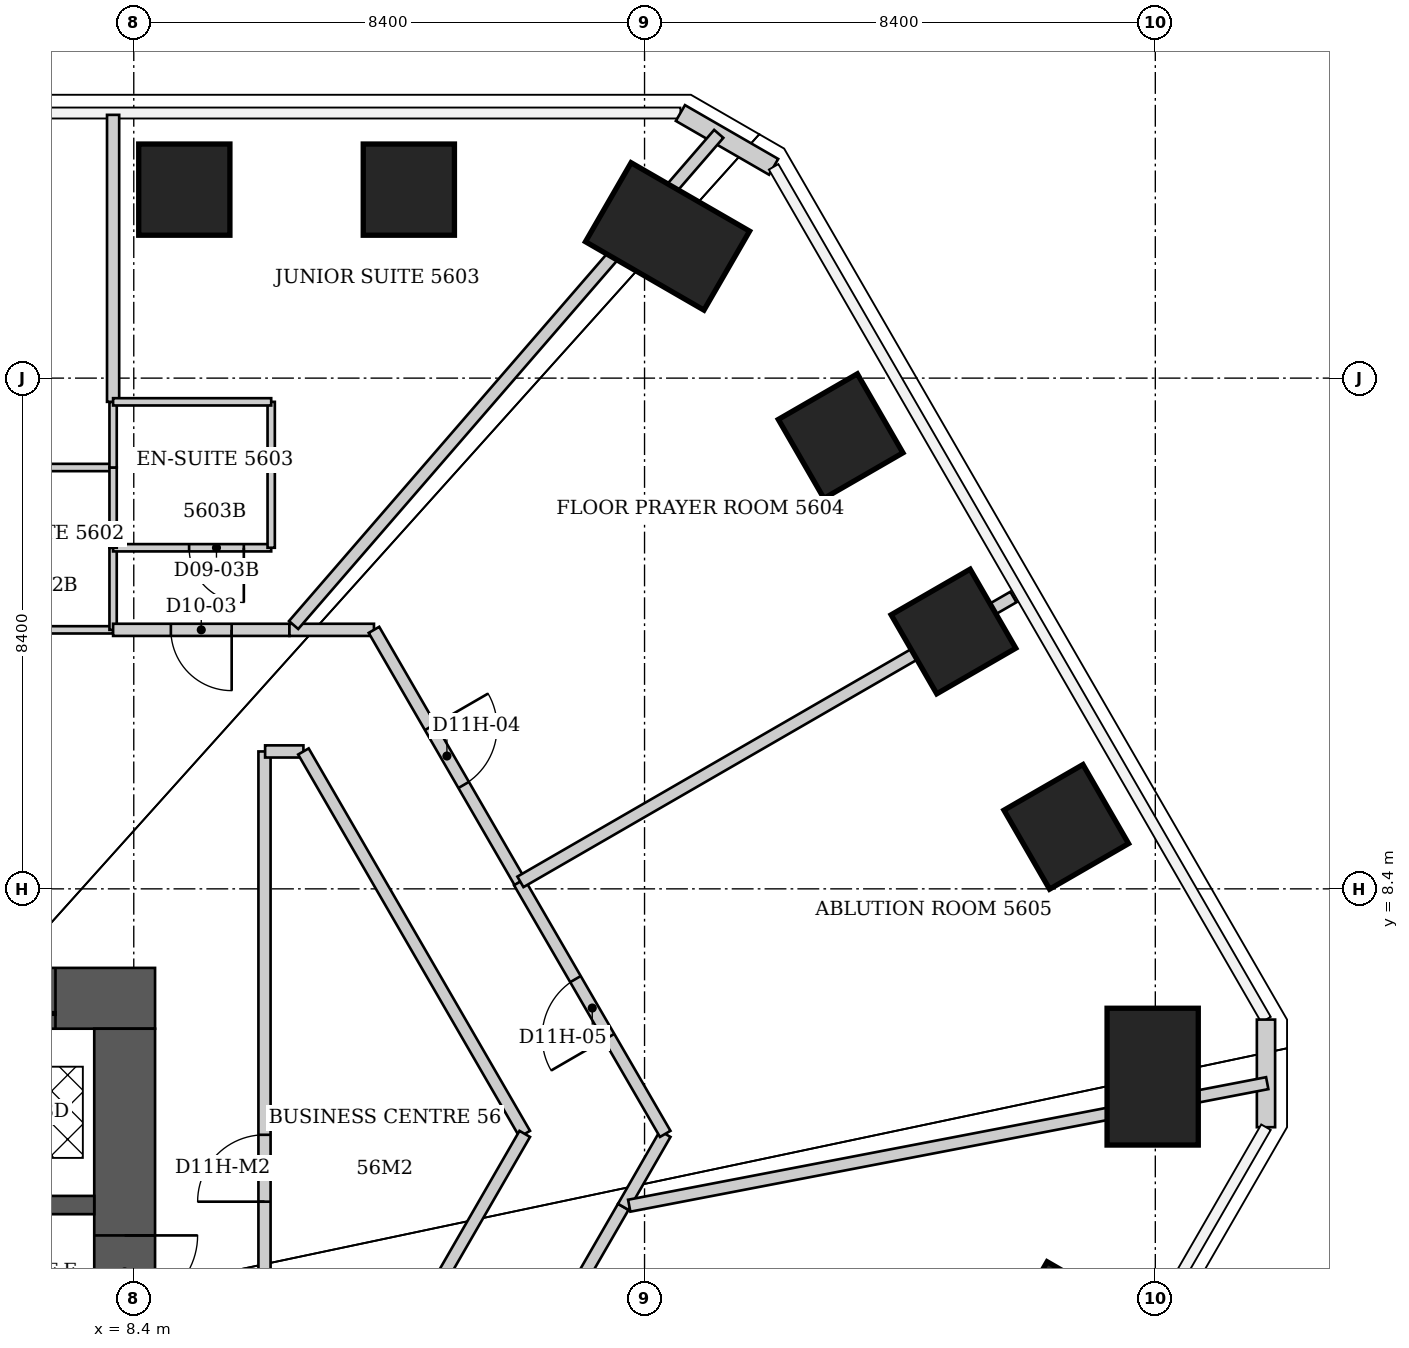
"""IFC4 building model, lengths in metres.
Left out: names, types, materials, properties, quantities, classifications, styles, units other than length and angle.
Written with IfcOpenShell. Run it as: python <this file> out.ifc"""

import sys

from ifc_helpers import new_model, si_unit, direction, frame, frame_2d, origin, origin_2d, place, context, subcontext, project, spatial, rectangle, extrude, element, fill, save


model = new_model("IFC4")
c1 = context("Model", 3, precision=1e-05, world=origin(), true_north=direction((0.0, 1.0)))
c2 = subcontext(c1, "Body", "Model", "MODEL_VIEW")
j1 = project(units=[si_unit("LENGTHUNIT", "METRE"), si_unit("PLANEANGLEUNIT", "RADIAN")], contexts=[c1])
p1 = place(None, origin())
s1 = spatial("IfcSite", under=j1, at=p1, CompositionType="ELEMENT")
p2 = place(p1, origin())
s2 = spatial("IfcBuilding", under=s1, at=p2, CompositionType="ELEMENT")
p3 = place(p2, frame((0.0, 0.0, 225.0)))
s3 = spatial("IfcBuildingStorey", under=s2, at=p3, CompositionType="ELEMENT", Elevation=225.0)
for number, where, z_axis, x_axis in (
    (1, (9.231, 19.9, 0.0), (0.0, 0.0, 1.0), (0.0, 1.0, 0.0)),
    (2, (12.924, 19.9, 0.0), (0.0, 0.0, 1.0), (0.0, 1.0, 0.0)),
):
    element("IfcColumn", number, at=place(p3, frame(where, z_axis=z_axis, x_axis=x_axis)), inside=s3, PredefinedType="COLUMN", context=c2, shape_type="SweptSolid", body=[
        extrude(rectangle(XDim=1.5, YDim=1.5, at=origin_2d()), origin(), (0.0, 0.0, 1.0), 3.8),
    ])
p4 = place(p3, frame((17.178, 19.131, 0.0), z_axis=(0.0, 0.0, 1.0), x_axis=(0.5, 0.866025403784, 0.0)))
e3 = element("IfcColumn", 3, at=p4, inside=s3, PredefinedType="COLUMN", context=c2, shape_type="SweptSolid", body=[
    extrude(rectangle(XDim=1.5, YDim=2.25, at=origin_2d()), origin(), (0.0, 0.0, 1.0), 3.8),
])
for number, where, z_axis, x_axis in (
    (4, (20.025, 15.846, 0.0), (0.0, 0.0, 1.0), (0.866, 0.5, 0.0)),
    (5, (21.88, 12.633, 0.0), (0.0, 0.0, 1.0), (0.866, 0.5, 0.0)),
    (6, (23.735, 9.419, 0.0), (0.0, 0.0, 1.0), (0.866, 0.5, 0.0)),
):
    element("IfcColumn", number, at=place(p3, frame(where, z_axis=z_axis, x_axis=x_axis)), inside=s3, PredefinedType="COLUMN", context=c2, shape_type="SweptSolid", body=[
        extrude(rectangle(XDim=1.5, YDim=1.5, at=origin_2d()), origin(), (0.0, 0.0, 1.0), 3.8),
    ])
p5 = place(p3, frame((25.156, 5.311, 0.0), z_axis=(0.0, 0.0, 1.0), x_axis=(1.0, 0.0, 0.0)))
e7 = element("IfcColumn", 7, at=p5, inside=s3, PredefinedType="COLUMN", context=c2, shape_type="SweptSolid", body=[
    extrude(rectangle(XDim=1.5, YDim=2.25, at=origin_2d()), origin(), (0.0, 0.0, 1.0), 3.8),
])
p6 = place(p3, frame((23.696, 1.242, 0.0), z_axis=(0.0, 0.0, 1.0), x_axis=(0.866025403784, -0.5, 0.0)))
e8 = element("IfcColumn", 8, at=p6, inside=s3, PredefinedType="COLUMN", context=c2, shape_type="SweptSolid", body=[
    extrude(rectangle(XDim=1.5, YDim=1.5, at=origin_2d()), origin(), (0.0, 0.0, 1.0), 3.8),
])
p7 = place(p3, frame((-8.75, 6.6, 0.0), z_axis=(0.0, 0.0, 1.0), x_axis=(1.0, 0.0, 0.0)))
e9 = element("IfcWall", 9, at=p7, inside=s3, PredefinedType="SHEAR", context=c2, shape_type="SweptSolid", body=[
    extrude(rectangle(XDim=17.5, YDim=1.0, at=frame_2d((8.75, 0.0))), origin(), (0.0, 0.0, 1.0), 3.8),
])
p8 = place(p7, frame((6.887, 0.0, 0.0)))
e10 = element("IfcOpeningElement", 10, at=p8, cuts=e9, PredefinedType="OPENING", context=c2, shape_type="SweptSolid", body=[
    extrude(rectangle(XDim=1.1, YDim=2.1, at=frame_2d((0.55, 1.05))), frame((0.0, 0.5, 0.0), z_axis=(0.0, -1.0, 0.0), x_axis=(1.0, 0.0, 0.0)), (0.0, 0.0, 1.0), 1.0),
])
p9 = place(p7, frame((9.512, 0.0, 0.0)))
e11 = element("IfcOpeningElement", 11, at=p9, cuts=e9, PredefinedType="OPENING", context=c2, shape_type="SweptSolid", body=[
    extrude(rectangle(XDim=1.1, YDim=2.1, at=frame_2d((0.55, 1.05))), frame((0.0, 0.5, 0.0), z_axis=(0.0, -1.0, 0.0), x_axis=(1.0, 0.0, 0.0)), (0.0, 0.0, 1.0), 1.0),
])
p10 = place(p7, frame((12.137, 0.0, 0.0)))
e12 = element("IfcOpeningElement", 12, at=p10, cuts=e9, PredefinedType="OPENING", context=c2, shape_type="SweptSolid", body=[
    extrude(rectangle(XDim=1.1, YDim=2.1, at=frame_2d((0.55, 1.05))), frame((0.0, 0.5, 0.0), z_axis=(0.0, -1.0, 0.0), x_axis=(1.0, 0.0, 0.0)), (0.0, 0.0, 1.0), 1.0),
])
p11 = place(p7, frame((14.762, 0.0, 0.0)))
e13 = element("IfcOpeningElement", 13, at=p11, cuts=e9, PredefinedType="OPENING", context=c2, shape_type="SweptSolid", body=[
    extrude(rectangle(XDim=1.1, YDim=2.1, at=frame_2d((0.55, 1.05))), frame((0.0, 0.5, 0.0), z_axis=(0.0, -1.0, 0.0), x_axis=(1.0, 0.0, 0.0)), (0.0, 0.0, 1.0), 1.0),
])
p12 = place(p3, frame((8.25, -6.1, 0.0), z_axis=(0.0, 0.0, 1.0), x_axis=(0.0, 1.0, 0.0)))
e14 = element("IfcWall", 14, at=p12, inside=s3, PredefinedType="SHEAR", context=c2, shape_type="SweptSolid", body=[
    extrude(rectangle(XDim=12.2, YDim=1.0, at=frame_2d((6.1, 0.0))), origin(), (0.0, 0.0, 1.0), 3.8),
])
p13 = place(p12, frame((7.6, 0.0, 0.0)))
e15 = element("IfcOpeningElement", 15, at=p13, cuts=e14, PredefinedType="OPENING", context=c2, shape_type="SweptSolid", body=[
    extrude(rectangle(XDim=1.2, YDim=2.2, at=frame_2d((0.6, 1.1))), frame((0.0, 0.5, 0.0), z_axis=(0.0, -1.0, 0.0), x_axis=(1.0, 0.0, 0.0)), (0.0, 0.0, 1.0), 1.0),
])
p14 = place(p3, frame((-7.75, 3.2, 0.0), z_axis=(0.0, 0.0, 1.0), x_axis=(1.0, 0.0, 0.0)))
e16 = element("IfcWall", 16, at=p14, inside=s3, PredefinedType="SHEAR", context=c2, shape_type="SweptSolid", body=[
    extrude(rectangle(XDim=15.5, YDim=0.3, at=frame_2d((7.75, 0.0))), origin(), (0.0, 0.0, 1.0), 3.8),
])
p15 = place(p14, frame((1.95, 0.0, 0.0)))
e17 = element("IfcOpeningElement", 17, at=p15, cuts=e16, PredefinedType="OPENING", context=c2, shape_type="SweptSolid", body=[
    extrude(rectangle(XDim=1.1, YDim=2.2, at=frame_2d((0.55, 1.1))), frame((0.0, 0.15, 0.0), z_axis=(0.0, -1.0, 0.0), x_axis=(1.0, 0.0, 0.0)), (0.0, 0.0, 1.0), 0.3),
])
for number, where, z_axis, x_axis in (
    (18, (17.39, 21.16, 0.0), (0.0, 0.0, 1.0), (0.866, -0.5, 0.0)),
    (19, (27.02, 6.25, 0.0), (0.0, 0.0, 1.0), (0.0, -1.0, 0.0)),
):
    element("IfcWall", number, at=place(p3, frame(where, z_axis=z_axis, x_axis=x_axis)), inside=s3, PredefinedType="SOLIDWALL", context=c2, shape_type="SweptSolid", body=[
        extrude(rectangle(XDim=1.77, YDim=0.3, at=frame_2d((0.885, 0.0))), origin(), (0.0, 0.0, 1.0), 3.64),
    ])
p16 = place(p3, frame((8.06, 12.66, 0.0), z_axis=(0.0, 0.0, 1.0), x_axis=(-1.0, 0.0, 0.0)))
e20 = element("IfcWall", 20, at=p16, inside=s3, PredefinedType="PARTITIONING", context=c2, shape_type="SweptSolid", body=[
    extrude(rectangle(XDim=2.45, YDim=0.12, at=frame_2d((1.225, 0.0))), origin(), (0.0, 0.0, 1.0), 3.64),
])
p17 = place(p3, frame((8.06, 14.01, 0.0), z_axis=(0.0, 0.0, 1.0), x_axis=(0.0, -1.0, 0.0)))
e21 = element("IfcWall", 21, at=p17, inside=s3, PredefinedType="PARTITIONING", context=c2, shape_type="SweptSolid", body=[
    extrude(rectangle(XDim=1.35, YDim=0.12, at=frame_2d((0.675, 0.0))), origin(), (0.0, 0.0, 1.0), 3.64),
])
p18 = place(p3, frame((8.06, 14.01, 0.0), z_axis=(0.0, 0.0, 1.0), x_axis=(1.0, 0.0, 0.0)))
e22 = element("IfcWall", 22, at=p18, inside=s3, PredefinedType="PARTITIONING", context=c2, shape_type="SweptSolid", body=[
    extrude(rectangle(XDim=2.6, YDim=0.12, at=frame_2d((1.3, 0.0))), origin(), (0.0, 0.0, 1.0), 3.64),
])
p19 = place(p18, frame((1.25, 0.0, 0.0)))
e23 = element("IfcOpeningElement", 23, at=p19, cuts=e22, PredefinedType="OPENING", context=c2, shape_type="SweptSolid", body=[
    extrude(rectangle(XDim=0.9, YDim=2.03, at=frame_2d((0.45, 1.015))), frame((0.0, 0.06, 0.0), z_axis=(0.0, -1.0, 0.0), x_axis=(1.0, 0.0, 0.0)), (0.0, 0.0, 1.0), 0.12),
])
p20 = place(p3, frame((8.06, 15.33, 0.0), z_axis=(0.0, 0.0, 1.0), x_axis=(-1.0, 0.0, 0.0)))
e24 = element("IfcWall", 24, at=p20, inside=s3, PredefinedType="PARTITIONING", context=c2, shape_type="SweptSolid", body=[
    extrude(rectangle(XDim=2.46, YDim=0.12, at=frame_2d((1.23, 0.0))), origin(), (0.0, 0.0, 1.0), 3.64),
])
p21 = place(p3, frame((8.06, 15.33, 0.0), z_axis=(0.0, 0.0, 1.0), x_axis=(0.0, -1.0, 0.0)))
e25 = element("IfcWall", 25, at=p21, inside=s3, PredefinedType="PARTITIONING", context=c2, shape_type="SweptSolid", body=[
    extrude(rectangle(XDim=1.32, YDim=0.12, at=frame_2d((0.66, 0.0))), origin(), (0.0, 0.0, 1.0), 3.64),
])
p22 = place(p3, frame((8.06, 16.41, 0.0), z_axis=(0.0, 0.0, 1.0), x_axis=(0.0, -1.0, 0.0)))
e26 = element("IfcWall", 26, at=p22, inside=s3, PredefinedType="PARTITIONING", context=c2, shape_type="SweptSolid", body=[
    extrude(rectangle(XDim=1.08, YDim=0.12, at=frame_2d((0.54, 0.0))), origin(), (0.0, 0.0, 1.0), 3.64),
])
p23 = place(p3, frame((8.06, 21.13, 0.0), z_axis=(0.0, 0.0, 1.0), x_axis=(0.0, -1.0, 0.0)))
e27 = element("IfcWall", 27, at=p23, inside=s3, PredefinedType="PARTITIONING", context=c2, shape_type="SweptSolid", body=[
    extrude(rectangle(XDim=4.72, YDim=0.2, at=frame_2d((2.36, 0.0))), origin(), (0.0, 0.0, 1.0), 3.64),
])
p24 = place(p3, frame((10.55, -3.05, 0.0), z_axis=(0.0, 0.0, 1.0), x_axis=(0.0, 1.0, 0.0)))
e28 = element("IfcWall", 28, at=p24, inside=s3, PredefinedType="PARTITIONING", context=c2, shape_type="SweptSolid", body=[
    extrude(rectangle(XDim=13.71, YDim=0.2, at=frame_2d((6.855, 0.0))), origin(), (0.0, 0.0, 1.0), 3.64),
])
p25 = place(p24, frame((6.305, 0.0, 0.0)))
e29 = element("IfcOpeningElement", 29, at=p25, cuts=e28, PredefinedType="OPENING", context=c2, shape_type="SweptSolid", body=[
    extrude(rectangle(XDim=1.1, YDim=2.2, at=frame_2d((0.55, 1.1))), frame((0.0, 0.1, 0.0), z_axis=(0.0, -1.0, 0.0), x_axis=(1.0, 0.0, 0.0)), (0.0, 0.0, 1.0), 0.2),
])
p26 = place(p3, frame((10.56, 10.66, 0.0), z_axis=(0.0, 0.0, 1.0), x_axis=(1.0, 0.0, 0.0)))
e30 = element("IfcWall", 30, at=p26, inside=s3, PredefinedType="PARTITIONING", context=c2, shape_type="SweptSolid", body=[
    extrude(rectangle(XDim=0.63, YDim=0.2, at=frame_2d((0.315, 0.0))), origin(), (0.0, 0.0, 1.0), 3.64),
])
p27 = place(p3, frame((10.66, 14.01, 0.0), z_axis=(0.0, 0.0, 1.0), x_axis=(0.0, 1.0, 0.0)))
e31 = element("IfcWall", 31, at=p27, inside=s3, PredefinedType="PARTITIONING", context=c2, shape_type="SweptSolid", body=[
    extrude(rectangle(XDim=2.4, YDim=0.12, at=frame_2d((1.2, 0.0))), origin(), (0.0, 0.0, 1.0), 3.64),
])
p28 = place(p3, frame((10.66, 16.41, 0.0), z_axis=(0.0, 0.0, 1.0), x_axis=(-1.0, 0.0, 0.0)))
e32 = element("IfcWall", 32, at=p28, inside=s3, PredefinedType="PARTITIONING", context=c2, shape_type="SweptSolid", body=[
    extrude(rectangle(XDim=2.6, YDim=0.12, at=frame_2d((1.3, 0.0))), origin(), (0.0, 0.0, 1.0), 3.64),
])
p29 = place(p3, frame((10.96, 12.66, 0.0), z_axis=(0.0, 0.0, 1.0), x_axis=(-1.0, 0.0, 0.0)))
e33 = element("IfcWall", 33, at=p29, inside=s3, PredefinedType="PARTITIONING", context=c2, shape_type="SweptSolid", body=[
    extrude(rectangle(XDim=2.9, YDim=0.2, at=frame_2d((1.45, 0.0))), origin(), (0.0, 0.0, 1.0), 3.64),
])
p30 = place(p29, frame((0.95, 0.0, 0.0)))
e34 = element("IfcOpeningElement", 34, at=p30, cuts=e33, PredefinedType="OPENING", context=c2, shape_type="SweptSolid", body=[
    extrude(rectangle(XDim=1.0, YDim=2.13, at=frame_2d((0.5, 1.065))), frame((0.0, 0.1, 0.0), z_axis=(0.0, -1.0, 0.0), x_axis=(1.0, 0.0, 0.0)), (0.0, 0.0, 1.0), 0.2),
])
p31 = place(p3, frame((11.19, 10.66, 0.0), z_axis=(0.0, 0.0, 1.0), x_axis=(0.500899863475, -0.865505243642, 0.0)))
e35 = element("IfcWall", 35, at=p31, inside=s3, PredefinedType="PARTITIONING", context=c2, shape_type="SweptSolid", body=[
    extrude(rectangle(XDim=7.267, YDim=0.2, at=frame_2d((3.634, 0.0))), origin(), (0.0, 0.0, 1.0), 3.64),
])
p32 = place(p3, frame((12.35, 12.66, 0.0), z_axis=(0.0, 0.0, 1.0), x_axis=(-1.0, 0.0, 0.0)))
e36 = element("IfcWall", 36, at=p32, inside=s3, PredefinedType="PARTITIONING", context=c2, shape_type="SweptSolid", body=[
    extrude(rectangle(XDim=1.39, YDim=0.2, at=frame_2d((0.695, 0.0))), origin(), (0.0, 0.0, 1.0), 3.64),
])
p33 = place(p3, frame((12.35, 12.66, 0.0), z_axis=(0.0, 0.0, 1.0), x_axis=(0.500618647881, -0.86566793252, 0.0)))
e37 = element("IfcWall", 37, at=p33, inside=s3, PredefinedType="PARTITIONING", context=c2, shape_type="SweptSolid", body=[
    extrude(rectangle(XDim=4.794, YDim=0.2, at=frame_2d((2.397, 0.0))), origin(), (0.0, 0.0, 1.0), 3.64),
])
p34 = place(p33, frame((1.847, 0.0, 0.0)))
e38 = element("IfcOpeningElement", 38, at=p34, cuts=e37, PredefinedType="OPENING", context=c2, shape_type="SweptSolid", body=[
    extrude(rectangle(XDim=1.1, YDim=2.2, at=frame_2d((0.55, 1.1))), frame((0.0, 0.1, 0.0), z_axis=(0.0, -1.0, 0.0), x_axis=(1.0, 0.0, 0.0)), (0.0, 0.0, 1.0), 0.2),
])
p35 = place(p3, frame((13.13, -2.58, 0.0), z_axis=(0.0, 0.0, 1.0), x_axis=(0.500034373799, 0.866005557153, 0.0)))
e39 = element("IfcWall", 39, at=p35, inside=s3, PredefinedType="PARTITIONING", context=c2, shape_type="SweptSolid", body=[
    extrude(rectangle(XDim=6.64, YDim=0.2, at=frame_2d((3.32, 0.0))), origin(), (0.0, 0.0, 1.0), 3.64),
])
p36 = place(p35, frame((2.82, 0.0, 0.0)))
e40 = element("IfcOpeningElement", 40, at=p36, cuts=e39, PredefinedType="OPENING", context=c2, shape_type="SweptSolid", body=[
    extrude(rectangle(XDim=1.0, YDim=2.13, at=frame_2d((0.5, 1.065))), frame((0.0, 0.1, 0.0), z_axis=(0.0, -1.0, 0.0), x_axis=(1.0, 0.0, 0.0)), (0.0, 0.0, 1.0), 0.2),
])
p37 = place(p3, frame((14.83, 4.37, 0.0), z_axis=(0.0, 0.0, 1.0), x_axis=(-0.499659986498, -0.866221621695, 0.0)))
e41 = element("IfcWall", 41, at=p37, inside=s3, PredefinedType="PARTITIONING", context=c2, shape_type="SweptSolid", body=[
    extrude(rectangle(XDim=8.346, YDim=0.2, at=frame_2d((4.173, 0.0))), origin(), (0.0, 0.0, 1.0), 3.64),
])
p38 = place(p3, frame((16.45, 3.17, 0.0), z_axis=(0.0, 0.0, 1.0), x_axis=(0.49845455473, 0.866915830325, 0.0)))
e42 = element("IfcWall", 42, at=p38, inside=s3, PredefinedType="PARTITIONING", context=c2, shape_type="SweptSolid", body=[
    extrude(rectangle(XDim=1.384, YDim=0.2, at=frame_2d((0.692, 0.0))), origin(), (0.0, 0.0, 1.0), 3.64),
])
p39 = place(p3, frame((17.14, 4.37, 0.0), z_axis=(0.0, 0.0, 1.0), x_axis=(-0.501524901322, 0.865143209737, 0.0)))
e43 = element("IfcWall", 43, at=p39, inside=s3, PredefinedType="PARTITIONING", context=c2, shape_type="SweptSolid", body=[
    extrude(rectangle(XDim=4.785, YDim=0.2, at=frame_2d((2.393, 0.0))), origin(), (0.0, 0.0, 1.0), 3.64),
])
p40 = place(p39, frame((1.843, 0.0, 0.0)))
e44 = element("IfcOpeningElement", 44, at=p40, cuts=e43, PredefinedType="OPENING", context=c2, shape_type="SweptSolid", body=[
    extrude(rectangle(XDim=1.1, YDim=2.2, at=frame_2d((0.55, 1.1))), frame((0.0, 0.1, 0.0), z_axis=(0.0, -1.0, 0.0), x_axis=(1.0, 0.0, 0.0)), (0.0, 0.0, 1.0), 0.2),
])
p41 = place(p3, frame((18.02, 20.817, 0.0), z_axis=(0.0, 0.0, 1.0), x_axis=(-0.654429261747, -0.756123231603, 0.0)))
e45 = element("IfcWall", 45, at=p41, inside=s3, PredefinedType="PARTITIONING", context=c2, shape_type="SweptSolid", body=[
    extrude(rectangle(XDim=10.683, YDim=0.2, at=frame_2d((5.342, 0.0))), origin(), (0.0, 0.0, 1.0), 3.64),
])
p42 = place(p3, frame((22.866, 13.2, 0.0), z_axis=(0.0, 0.0, 1.0), x_axis=(-0.865840726882, -0.500319733442, 0.0)))
e46 = element("IfcWall", 46, at=p42, inside=s3, PredefinedType="PARTITIONING", context=c2, shape_type="SweptSolid", body=[
    extrude(rectangle(XDim=9.364, YDim=0.2, at=frame_2d((4.682, 0.0))), origin(), (0.0, 0.0, 1.0), 2.878),
])
p43 = place(p3, frame((27.041, 5.204, 0.0), z_axis=(0.0, 0.0, 1.0), x_axis=(-0.982047984466, -0.188631270488, 0.0)))
e47 = element("IfcWall", 47, at=p43, inside=s3, PredefinedType="PARTITIONING", context=c2, shape_type="SweptSolid", body=[
    extrude(rectangle(XDim=10.684, YDim=0.2, at=frame_2d((5.342, 0.0))), origin(), (0.0, 0.0, 1.0), 3.64),
])
p44 = place(p30, origin())
e48 = element("IfcDoor", 48, at=p44, inside=s3, OperationType="SINGLE_SWING_LEFT", PredefinedType="DOOR", context=c2, shape_type="SweptSolid", body=[
    extrude(rectangle(XDim=1.0, YDim=2.13, at=frame_2d((0.5, 1.065))), frame((0.0, 0.025, 0.0), z_axis=(0.0, -1.0, 0.0), x_axis=(1.0, 0.0, 0.0)), (0.0, 0.0, 1.0), 0.05),
])
fill(e34, e48)
p45 = place(p19, origin())
e49 = element("IfcDoor", 49, at=p45, inside=s3, OperationType="SINGLE_SWING_RIGHT", PredefinedType="DOOR", context=c2, shape_type="SweptSolid", body=[
    extrude(rectangle(XDim=0.9, YDim=2.03, at=frame_2d((0.45, 1.015))), frame((0.0, 0.025, 0.0), z_axis=(0.0, -1.0, 0.0), x_axis=(1.0, 0.0, 0.0)), (0.0, 0.0, 1.0), 0.05),
])
fill(e23, e49)
p46 = place(p34, origin())
e50 = element("IfcDoor", 50, at=p46, inside=s3, OperationType="SINGLE_SWING_LEFT", PredefinedType="DOOR", context=c2, shape_type="SweptSolid", body=[
    extrude(rectangle(XDim=1.1, YDim=2.2, at=frame_2d((0.55, 1.1))), frame((0.0, 0.025, 0.0), z_axis=(0.0, -1.0, 0.0), x_axis=(1.0, 0.0, 0.0)), (0.0, 0.0, 1.0), 0.05),
])
fill(e38, e50)
p47 = place(p40, origin())
e51 = element("IfcDoor", 51, at=p47, inside=s3, OperationType="SINGLE_SWING_LEFT", PredefinedType="DOOR", context=c2, shape_type="SweptSolid", body=[
    extrude(rectangle(XDim=1.1, YDim=2.2, at=frame_2d((0.55, 1.1))), frame((0.0, 0.025, 0.0), z_axis=(0.0, -1.0, 0.0), x_axis=(1.0, 0.0, 0.0)), (0.0, 0.0, 1.0), 0.05),
])
fill(e44, e51)
p48 = place(p25, origin())
e52 = element("IfcDoor", 52, at=p48, inside=s3, OperationType="SINGLE_SWING_LEFT", PredefinedType="DOOR", context=c2, shape_type="SweptSolid", body=[
    extrude(rectangle(XDim=1.1, YDim=2.2, at=frame_2d((0.55, 1.1))), frame((0.0, 0.025, 0.0), z_axis=(0.0, -1.0, 0.0), x_axis=(1.0, 0.0, 0.0)), (0.0, 0.0, 1.0), 0.05),
])
fill(e29, e52)
p49 = place(p13, origin())
e53 = element("IfcDoor", 53, at=p49, inside=s3, OperationType="SINGLE_SWING_RIGHT", PredefinedType="DOOR", context=c2, shape_type="SweptSolid", body=[
    extrude(rectangle(XDim=1.2, YDim=2.2, at=frame_2d((0.6, 1.1))), frame((0.0, 0.025, 0.0), z_axis=(0.0, -1.0, 0.0), x_axis=(1.0, 0.0, 0.0)), (0.0, 0.0, 1.0), 0.05),
])
fill(e15, e53)
p50 = place(p11, origin())
e54 = element("IfcDoor", 54, at=p50, inside=s3, OperationType="DOUBLE_DOOR_SLIDING", PredefinedType="DOOR", context=c2, shape_type="SweptSolid", body=[
    extrude(rectangle(XDim=1.1, YDim=2.1, at=frame_2d((0.55, 1.05))), frame((0.0, 0.025, 0.0), z_axis=(0.0, -1.0, 0.0), x_axis=(1.0, 0.0, 0.0)), (0.0, 0.0, 1.0), 0.05),
])
fill(e13, e54)
save(model, sys.argv[1])
